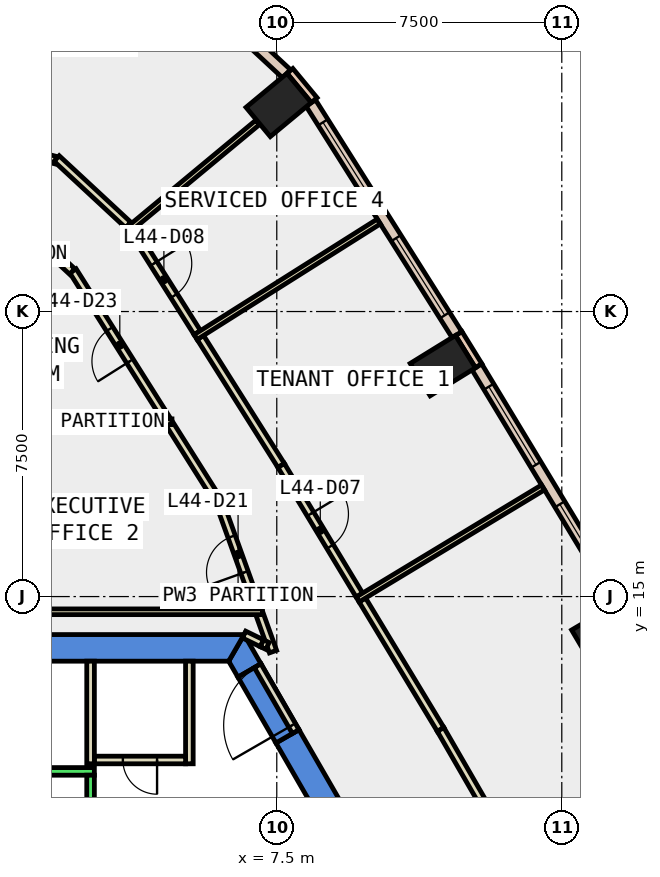
"""IFC4 building model, lengths in metres.
Left out: names, types, materials, properties, quantities, classifications, styles, units other than length and angle.
Written with IfcOpenShell. Run it as: python <this file> out.ifc"""

import sys

from ifc_helpers import new_model, si_unit, direction, frame, frame_2d, origin, origin_2d, place, context, subcontext, project, spatial, polyline, rectangle, outline, extrude, element, fill, save


model = new_model("IFC4")
c1 = context("Model", 3, precision=1e-05, world=origin(), true_north=direction((0.0, 1.0)))
c2 = subcontext(c1, "Body", "Model", "MODEL_VIEW")
j1 = project(units=[si_unit("LENGTHUNIT", "METRE"), si_unit("PLANEANGLEUNIT", "RADIAN")], contexts=[c1])
p1 = place(None, origin())
s1 = spatial("IfcSite", under=j1, at=p1, CompositionType="ELEMENT")
p2 = place(p1, origin())
s2 = spatial("IfcBuilding", under=s1, at=p2, CompositionType="ELEMENT")
p3 = place(p2, frame((0.0, 0.0, 198.2)))
s3 = spatial("IfcBuildingStorey", under=s2, at=p3, CompositionType="ELEMENT", Elevation=198.2)
for number, where, z_axis, x_axis in (
    (1, (16.116, 14.046, -0.4), (0.0, 0.0, 1.0), (-0.509, 0.861, 0.0)),
    (2, (11.869, 21.076, -0.4), (0.0, 0.0, 1.0), (-0.525, 0.851, 0.0)),
    (3, (7.549, 27.935, -0.4), (0.0, 0.0, 1.0), (-0.639, 0.769, 0.0)),
):
    element("IfcColumn", number, at=place(p3, frame(where, z_axis=z_axis, x_axis=x_axis)), inside=s3, PredefinedType="COLUMN", context=c2, shape_type="SweptSolid", body=[
        extrude(rectangle(XDim=1.0, YDim=1.4, at=origin_2d()), origin(), (0.0, 0.0, 1.0), 4.2),
    ])
p4 = place(p3, frame((0.0, 0.0, -0.4)))
e4 = element("IfcWall", 4, at=p4, inside=s3, PredefinedType="SHEAR", context=c2, shape_type="SweptSolid", body=[
    extrude(outline(polyline([(8.084, 11.498), (7.478, 11.148), (12.471, 2.5), (13.279, 2.5), (8.084, 11.498)])), origin(), (0.0, 0.0, 1.0), 4.2),
])
p5 = place(p3, frame((0.0, 0.0, -0.4)))
e5 = element("IfcWall", 5, at=p5, inside=s3, PredefinedType="SHEAR", context=c2, shape_type="SweptSolid", body=[
    extrude(outline(polyline([(6.478, 12.88), (7.084, 13.23), (6.64, 14.0), (6.235, 13.3), (6.478, 12.88)])), origin(), (0.0, 0.0, 1.0), 4.2),
])
p6 = place(p3, frame((0.0, 0.0, 3.6)))
e6 = element("IfcWall", 6, at=p6, inside=s3, PredefinedType="SHEAR", context=c2, shape_type="SweptSolid", body=[
    extrude(outline(polyline([(7.084, 13.23), (6.478, 12.88), (7.478, 11.148), (8.084, 11.498), (7.084, 13.23)])), origin(), (0.0, 0.0, 1.0), 0.2),
])
p7 = place(p3, frame((0.0, 0.0, -0.4)))
e7 = element("IfcWall", 7, at=p7, inside=s3, PredefinedType="SHEAR", context=c2, shape_type="SweptSolid", body=[
    extrude(outline(polyline([(6.64, 14.0), (-6.64, 14.0), (-6.235, 13.3), (6.235, 13.3), (6.64, 14.0)])), origin(), (0.0, 0.0, 1.0), 4.2),
])
p8 = place(p3, frame((12.813, 21.071, 0.0), z_axis=(0.0, 0.0, 1.0), x_axis=(-0.525648735675, 0.850701714282, 0.0)))
e8 = element("IfcWall", 8, at=p8, inside=s3, PredefinedType="STANDARD", context=c2, shape_type="SweptSolid", body=[
    extrude(rectangle(XDim=1.0, YDim=0.2, at=frame_2d((0.5, 0.0))), origin(), (0.0, 0.0, 1.0), 3.8),
])
p9 = place(p3, frame((8.484, 28.061, 0.0), z_axis=(0.0, 0.0, 1.0), x_axis=(-0.637972365578, 0.770059257953, 0.0)))
e9 = element("IfcWall", 9, at=p9, inside=s3, PredefinedType="STANDARD", context=c2, shape_type="SweptSolid", body=[
    extrude(rectangle(XDim=1.0, YDim=0.2, at=frame_2d((0.5, 0.0))), origin(), (0.0, 0.0, 1.0), 3.8),
])
p10 = place(p3, frame((16.504, 14.855, 0.0), z_axis=(0.0, 0.0, 1.0), x_axis=(-0.517159962006, 0.855888762456, 0.0)))
e10 = element("IfcWall", 10, at=p10, inside=s3, PredefinedType="STANDARD", context=c2, shape_type="SweptSolid", body=[
    extrude(rectangle(XDim=7.23, YDim=0.3, at=frame_2d((3.615, 0.0))), origin(), (0.0, 0.0, 1.0), 3.8),
])
p11 = place(p10, frame((0.607, 0.0, 0.9)))
e11 = element("IfcOpeningElement", 11, at=p11, cuts=e10, PredefinedType="OPENING", context=c2, shape_type="SweptSolid", body=[
    extrude(rectangle(XDim=2.4, YDim=2.6, at=frame_2d((1.2, 1.3))), frame((0.0, 0.16, 0.0), z_axis=(0.0, -1.0, 0.0), x_axis=(1.0, 0.0, 0.0)), (0.0, 0.0, 1.0), 0.32),
])
p12 = place(p10, frame((4.222, 0.0, 0.9)))
e12 = element("IfcOpeningElement", 12, at=p12, cuts=e10, PredefinedType="OPENING", context=c2, shape_type="SweptSolid", body=[
    extrude(rectangle(XDim=2.4, YDim=2.6, at=frame_2d((1.2, 1.3))), frame((0.0, 0.16, 0.0), z_axis=(0.0, -1.0, 0.0), x_axis=(1.0, 0.0, 0.0)), (0.0, 0.0, 1.0), 0.32),
])
p13 = place(p3, frame((12.241, 21.892, 0.0), z_axis=(0.0, 0.0, 1.0), x_axis=(-0.533680752529, 0.845686025887, 0.0)))
e13 = element("IfcWall", 13, at=p13, inside=s3, PredefinedType="STANDARD", context=c2, shape_type="SweptSolid", body=[
    extrude(rectangle(XDim=7.208, YDim=0.3, at=frame_2d((3.604, 0.0))), origin(), (0.0, 0.0, 1.0), 3.8),
])
p14 = place(p13, frame((0.602, 0.0, 0.9)))
e14 = element("IfcOpeningElement", 14, at=p14, cuts=e13, PredefinedType="OPENING", context=c2, shape_type="SweptSolid", body=[
    extrude(rectangle(XDim=2.4, YDim=2.6, at=frame_2d((1.2, 1.3))), frame((0.0, 0.16, 0.0), z_axis=(0.0, -1.0, 0.0), x_axis=(1.0, 0.0, 0.0)), (0.0, 0.0, 1.0), 0.32),
])
p15 = place(p13, frame((4.206, 0.0, 0.9)))
e15 = element("IfcOpeningElement", 15, at=p15, cuts=e13, PredefinedType="OPENING", context=c2, shape_type="SweptSolid", body=[
    extrude(rectangle(XDim=2.4, YDim=2.6, at=frame_2d((1.2, 1.3))), frame((0.0, 0.16, 0.0), z_axis=(0.0, -1.0, 0.0), x_axis=(1.0, 0.0, 0.0)), (0.0, 0.0, 1.0), 0.32),
])
p16 = place(p3, frame((7.757, 28.756, 0.0), z_axis=(0.0, 0.0, 1.0), x_axis=(-0.732897351132, 0.680339233547, 0.0)))
e16 = element("IfcWall", 16, at=p16, inside=s3, PredefinedType="STANDARD", context=c2, shape_type="SweptSolid", body=[
    extrude(rectangle(XDim=3.767, YDim=0.3, at=frame_2d((1.884, 0.0))), origin(), (0.0, 0.0, 1.0), 3.8),
])
p17 = place(p16, frame((1.184, 0.0, 0.9)))
e17 = element("IfcOpeningElement", 17, at=p17, cuts=e16, PredefinedType="OPENING", context=c2, shape_type="SweptSolid", body=[
    extrude(rectangle(XDim=1.4, YDim=2.6, at=frame_2d((0.7, 1.3))), frame((0.0, 0.16, 0.0), z_axis=(0.0, -1.0, 0.0), x_axis=(1.0, 0.0, 0.0)), (0.0, 0.0, 1.0), 0.32),
])
p18 = place(p3, frame((6.64, 14.0, 0.0), z_axis=(0.0, 0.0, 1.0), x_axis=(0.899046412443, -0.437853341055, 0.0)))
e18 = element("IfcWall", 18, at=p18, inside=s3, PredefinedType="PARTITIONING", context=c2, shape_type="SweptSolid", body=[
    extrude(rectangle(XDim=0.523, YDim=0.2, at=frame_2d((0.261, 0.0))), origin(), (0.0, 0.0, 1.0), 3.8),
])
p19 = place(p3, frame((7.401, 13.552, 0.0), z_axis=(0.0, 0.0, 1.0), x_axis=(-0.337944878606, 0.941165904091, 0.0)))
e19 = element("IfcWall", 19, at=p19, inside=s3, PredefinedType="PARTITIONING", context=c2, shape_type="SweptSolid", body=[
    extrude(rectangle(XDim=1.038, YDim=0.2, at=frame_2d((0.519, 0.0))), origin(), (0.0, 0.0, 1.0), 3.8),
])
p20 = place(p3, frame((6.999, 14.671, 0.0), z_axis=(0.0, 0.0, 1.0), x_axis=(-0.338795881304, 0.940859899672, 0.0)))
e20 = element("IfcWall", 20, at=p20, inside=s3, PredefinedType="PARTITIONING", context=c2, shape_type="SweptSolid", body=[
    extrude(rectangle(XDim=3.055, YDim=0.2, at=frame_2d((1.527, 0.0))), origin(), (0.0, 0.0, 1.0), 3.8),
])
p21 = place(p20, frame((1.027, 0.0, 0.0)))
e21 = element("IfcOpeningElement", 21, at=p21, cuts=e20, PredefinedType="OPENING", context=c2, shape_type="SweptSolid", body=[
    extrude(rectangle(XDim=1.0, YDim=2.1, at=frame_2d((0.5, 1.05))), frame((0.0, 0.11, 0.0), z_axis=(0.0, -1.0, 0.0), x_axis=(1.0, 0.0, 0.0)), (0.0, 0.0, 1.0), 0.22),
])
p22 = place(p3, frame((5.945, 17.535, 0.0), z_axis=(0.0, 0.0, 1.0), x_axis=(-0.533581643518, 0.845748561749, 0.0)))
e22 = element("IfcWall", 22, at=p22, inside=s3, PredefinedType="PARTITIONING", context=c2, shape_type="SweptSolid", body=[
    extrude(rectangle(XDim=2.367, YDim=0.2, at=frame_2d((1.184, 0.0))), origin(), (0.0, 0.0, 1.0), 3.8),
])
p23 = place(p3, frame((4.602, 19.663, 0.0), z_axis=(0.0, 0.0, 1.0), x_axis=(-0.533664968846, 0.845695986171, 0.0)))
e23 = element("IfcWall", 23, at=p23, inside=s3, PredefinedType="PARTITIONING", context=c2, shape_type="SweptSolid", body=[
    extrude(rectangle(XDim=4.621, YDim=0.2, at=frame_2d((2.311, 0.0))), origin(), (0.0, 0.0, 1.0), 3.8),
])
p24 = place(p23, frame((1.81, 0.0, 0.0)))
e24 = element("IfcOpeningElement", 24, at=p24, cuts=e23, PredefinedType="OPENING", context=c2, shape_type="SweptSolid", body=[
    extrude(rectangle(XDim=1.0, YDim=2.1, at=frame_2d((0.5, 1.05))), frame((0.0, 0.11, 0.0), z_axis=(0.0, -1.0, 0.0), x_axis=(1.0, 0.0, 0.0)), (0.0, 0.0, 1.0), 0.22),
])
p25 = place(p3, frame((2.116, 23.554, 0.0), z_axis=(0.0, 0.0, 1.0), x_axis=(-0.732722533409, 0.680527507919, 0.0)))
e25 = element("IfcWall", 25, at=p25, inside=s3, PredefinedType="PARTITIONING", context=c2, shape_type="SweptSolid", body=[
    extrude(rectangle(XDim=1.838, YDim=0.2, at=frame_2d((0.919, 0.0))), origin(), (0.0, 0.0, 1.0), 3.8),
])
p26 = place(p3, frame((9.752, 14.911, 0.0), z_axis=(0.0, 0.0, 1.0), x_axis=(0.517135291957, -0.855903668535, 0.0)))
e26 = element("IfcWall", 26, at=p26, inside=s3, PredefinedType="PARTITIONING", context=c2, shape_type="SweptSolid", body=[
    extrude(rectangle(XDim=3.982, YDim=0.2, at=frame_2d((1.991, 0.0))), origin(), (0.0, 0.0, 1.0), 3.8),
])
p27 = place(p3, frame((11.811, 11.503, 0.0), z_axis=(0.0, 0.0, 1.0), x_axis=(0.500013420409, -0.866017655369, 0.0)))
e27 = element("IfcWall", 27, at=p27, inside=s3, PredefinedType="PARTITIONING", context=c2, shape_type="SweptSolid", body=[
    extrude(rectangle(XDim=8.038, YDim=0.2, at=frame_2d((4.019, 0.0))), origin(), (0.0, 0.0, 1.0), 3.8),
])
p28 = place(p27, frame((3.594, 0.0, 0.0)))
e28 = element("IfcOpeningElement", 28, at=p28, cuts=e27, PredefinedType="OPENING", context=c2, shape_type="SweptSolid", body=[
    extrude(rectangle(XDim=1.0, YDim=2.1, at=frame_2d((0.5, 1.05))), frame((0.0, 0.11, 0.0), z_axis=(0.0, -1.0, 0.0), x_axis=(1.0, 0.0, 0.0)), (0.0, 0.0, 1.0), 0.22),
])
p29 = place(p3, frame((5.489, 21.817, 0.0), z_axis=(0.0, 0.0, 1.0), x_axis=(0.533790022325, -0.845617059943, 0.0)))
e29 = element("IfcWall", 29, at=p29, inside=s3, PredefinedType="PARTITIONING", context=c2, shape_type="SweptSolid", body=[
    extrude(rectangle(XDim=3.983, YDim=0.2, at=frame_2d((1.991, 0.0))), origin(), (0.0, 0.0, 1.0), 3.8),
])
p30 = place(p3, frame((7.615, 18.449, 0.0), z_axis=(0.0, 0.0, 1.0), x_axis=(0.516918251554, -0.856034766356, 0.0)))
e30 = element("IfcWall", 30, at=p30, inside=s3, PredefinedType="PARTITIONING", context=c2, shape_type="SweptSolid", body=[
    extrude(rectangle(XDim=3.983, YDim=0.2, at=frame_2d((1.992, 0.0))), origin(), (0.0, 0.0, 1.0), 3.8),
])
p31 = place(p30, frame((1.492, 0.0, 0.0)))
e31 = element("IfcOpeningElement", 31, at=p31, cuts=e30, PredefinedType="OPENING", context=c2, shape_type="SweptSolid", body=[
    extrude(rectangle(XDim=1.0, YDim=2.1, at=frame_2d((0.5, 1.05))), frame((0.0, 0.11, 0.0), z_axis=(0.0, -1.0, 0.0), x_axis=(1.0, 0.0, 0.0)), (0.0, 0.0, 1.0), 0.22),
])
p32 = place(p3, frame((3.65, 24.731, 0.0), z_axis=(0.0, 0.0, 1.0), x_axis=(0.533756056831, -0.845638499476, 0.0)))
e32 = element("IfcWall", 32, at=p32, inside=s3, PredefinedType="PARTITIONING", context=c2, shape_type="SweptSolid", body=[
    extrude(rectangle(XDim=3.296, YDim=0.2, at=frame_2d((1.648, 0.0))), origin(), (0.0, 0.0, 1.0), 3.8),
])
p33 = place(p32, frame((1.148, 0.0, 0.0)))
e33 = element("IfcOpeningElement", 33, at=p33, cuts=e32, PredefinedType="OPENING", context=c2, shape_type="SweptSolid", body=[
    extrude(rectangle(XDim=1.0, YDim=2.1, at=frame_2d((0.5, 1.05))), frame((0.0, 0.11, 0.0), z_axis=(0.0, -1.0, 0.0), x_axis=(1.0, 0.0, 0.0)), (0.0, 0.0, 1.0), 0.22),
])
p34 = place(p3, frame((-0.097, 26.936, 0.0), z_axis=(0.0, 0.0, 1.0), x_axis=(0.969093707519, -0.246692898252, 0.0)))
e34 = element("IfcWall", 34, at=p34, inside=s3, PredefinedType="PARTITIONING", context=c2, shape_type="SweptSolid", body=[
    extrude(rectangle(XDim=1.837, YDim=0.2, at=frame_2d((0.918, 0.0))), origin(), (0.0, 0.0, 1.0), 3.8),
])
p35 = place(p3, frame((1.707, 26.526, 0.0), z_axis=(0.0, 0.0, 1.0), x_axis=(0.732939008525, -0.680294355248, 0.0)))
e35 = element("IfcWall", 35, at=p35, inside=s3, PredefinedType="PARTITIONING", context=c2, shape_type="SweptSolid", body=[
    extrude(rectangle(XDim=2.569, YDim=0.2, at=frame_2d((1.285, 0.0))), origin(), (0.0, 0.0, 1.0), 3.8),
])
p36 = place(p3, frame((5.2, 13.3, 0.0), z_axis=(0.0, 0.0, 1.0), x_axis=(0.0, -1.0, 0.0)))
e36 = element("IfcWall", 36, at=p36, inside=s3, PredefinedType="PARTITIONING", context=c2, shape_type="SweptSolid", body=[
    extrude(rectangle(XDim=2.7, YDim=0.2, at=frame_2d((1.35, 0.0))), origin(), (0.0, 0.0, 1.0), 3.8),
])
p37 = place(p3, frame((5.1, 10.7, 0.0), z_axis=(0.0, 0.0, 1.0), x_axis=(-1.0, 0.0, 0.0)))
e37 = element("IfcWall", 37, at=p37, inside=s3, PredefinedType="PARTITIONING", context=c2, shape_type="SweptSolid", body=[
    extrude(rectangle(XDim=2.4, YDim=0.2, at=frame_2d((1.2, 0.0))), origin(), (0.0, 0.0, 1.0), 3.8),
])
p38 = place(p37, frame((0.75, 0.0, 0.0)))
e38 = element("IfcOpeningElement", 38, at=p38, cuts=e37, PredefinedType="OPENING", context=c2, shape_type="SweptSolid", body=[
    extrude(rectangle(XDim=0.9, YDim=2.1, at=frame_2d((0.45, 1.05))), frame((0.0, 0.11, 0.0), z_axis=(0.0, -1.0, 0.0), x_axis=(1.0, 0.0, 0.0)), (0.0, 0.0, 1.0), 0.22),
])
p39 = place(p3, frame((2.6, 10.6, 0.0), z_axis=(0.0, 0.0, 1.0), x_axis=(0.0, 1.0, 0.0)))
e39 = element("IfcWall", 39, at=p39, inside=s3, PredefinedType="PARTITIONING", context=c2, shape_type="SweptSolid", body=[
    extrude(rectangle(XDim=2.7, YDim=0.2, at=frame_2d((1.35, 0.0))), origin(), (0.0, 0.0, 1.0), 3.8),
])
p40 = place(p3, frame((7.124, 14.6, 0.0), z_axis=(0.0, 0.0, 1.0), x_axis=(-1.0, 0.0, 0.0)))
e40 = element("IfcWall", 40, at=p40, inside=s3, PredefinedType="PARTITIONING", context=c2, shape_type="SweptSolid", body=[
    extrude(rectangle(XDim=6.724, YDim=0.15, at=frame_2d((3.362, 0.0))), origin(), (0.0, 0.0, 1.0), 3.8),
])
p41 = place(p3, frame((0.4, 19.6, 0.0), z_axis=(0.0, 0.0, 1.0), x_axis=(1.0, 0.0, 0.0)))
e41 = element("IfcWall", 41, at=p41, inside=s3, PredefinedType="PARTITIONING", context=c2, shape_type="SweptSolid", body=[
    extrude(rectangle(XDim=4.342, YDim=0.15, at=frame_2d((2.171, 0.0))), origin(), (0.0, 0.0, 1.0), 3.8),
])
p42 = place(p3, frame((9.628, 14.924, 0.0), z_axis=(0.0, 0.0, 1.0), x_axis=(0.855931736607, 0.517088834021, 0.0)))
e42 = element("IfcWall", 42, at=p42, inside=s3, PredefinedType="PARTITIONING", context=c2, shape_type="SweptSolid", body=[
    extrude(rectangle(XDim=5.699, YDim=0.15, at=frame_2d((2.85, 0.0))), origin(), (0.0, 0.0, 1.0), 3.8),
])
p43 = place(p3, frame((5.364, 21.827, 0.0), z_axis=(0.0, 0.0, 1.0), x_axis=(0.845716787596, 0.533632003517, 0.0)))
e43 = element("IfcWall", 43, at=p43, inside=s3, PredefinedType="PARTITIONING", context=c2, shape_type="SweptSolid", body=[
    extrude(rectangle(XDim=5.7, YDim=0.15, at=frame_2d((2.85, 0.0))), origin(), (0.0, 0.0, 1.0), 3.8),
])
p44 = place(p3, frame((3.586, 24.646, 0.0), z_axis=(0.0, 0.0, 1.0), x_axis=(0.769538645463, 0.638600245176, 0.0)))
e44 = element("IfcWall", 44, at=p44, inside=s3, PredefinedType="PARTITIONING", context=c2, shape_type="SweptSolid", body=[
    extrude(rectangle(XDim=4.43, YDim=0.15, at=frame_2d((2.215, 0.0))), origin(), (0.0, 0.0, 1.0), 3.8),
])
p45 = place(p3, frame((7.997, 11.448, 0.0), z_axis=(0.0, 0.0, 1.0), x_axis=(-0.50002537861, 0.866010750942, 0.0)))
e45 = element("IfcWall", 45, at=p45, inside=s3, PredefinedType="PARTITIONING", context=c2, shape_type="SweptSolid", body=[
    extrude(rectangle(XDim=2.0, YDim=0.2, at=frame_2d((1.0, 0.0))), origin(), (0.0, 0.0, 1.0), 2.4),
])
p46 = place(p45, frame((0.19, 0.0, 0.0)))
e46 = element("IfcOpeningElement", 46, at=p46, cuts=e45, PredefinedType="OPENING", context=c2, shape_type="SweptSolid", body=[
    extrude(rectangle(XDim=1.8, YDim=2.1, at=frame_2d((0.9, 1.05))), frame((0.0, 0.11, 0.0), z_axis=(0.0, -1.0, 0.0), x_axis=(1.0, 0.0, 0.0)), (0.0, 0.0, 1.0), 0.22),
])
p47 = place(p3, frame((7.11, 13.771, 0.0), z_axis=(0.0, 0.0, 1.0), x_axis=(0.900120852209, -0.435640277545, 0.0)))
e47 = element("IfcWall", 47, at=p47, inside=s3, PredefinedType="PARTITIONING", context=c2, shape_type="SweptSolid", body=[
    extrude(rectangle(XDim=0.161, YDim=0.2, at=frame_2d((0.081, 0.0))), origin(), (0.0, 0.0, 1.0), 2.4),
])
p48 = place(p3, frame((2.7, 10.4, 0.0), z_axis=(0.0, 0.0, 1.0), x_axis=(-1.0, 0.0, 0.0)))
e48 = element("IfcWall", 48, at=p48, inside=s3, PredefinedType="STANDARD", context=c2, shape_type="SweptSolid", body=[
    extrude(rectangle(XDim=5.4, YDim=0.2, at=frame_2d((2.7, 0.0))), origin(), (0.0, 0.0, 1.0), 3.8),
])
p49 = place(p3, frame((2.6, 7.9, 0.0), z_axis=(0.0, 0.0, 1.0), x_axis=(0.0, 1.0, 0.0)))
e49 = element("IfcWall", 49, at=p49, inside=s3, PredefinedType="STANDARD", context=c2, shape_type="SweptSolid", body=[
    extrude(rectangle(XDim=2.4, YDim=0.2, at=frame_2d((1.2, 0.0))), origin(), (0.0, 0.0, 1.0), 3.8),
])
p50 = place(p11, origin())
e50 = element("IfcWindow", 50, at=p50, inside=s3, PartitioningType="SINGLE_PANEL", PredefinedType="WINDOW", context=c2, shape_type="SweptSolid", body=[
    extrude(rectangle(XDim=2.4, YDim=2.6, at=frame_2d((1.2, 1.3))), frame((0.0, 0.03, 0.0), z_axis=(0.0, -1.0, 0.0), x_axis=(1.0, 0.0, 0.0)), (0.0, 0.0, 1.0), 0.06),
])
fill(e11, e50)
p51 = place(p12, origin())
e51 = element("IfcWindow", 51, at=p51, inside=s3, PartitioningType="SINGLE_PANEL", PredefinedType="WINDOW", context=c2, shape_type="SweptSolid", body=[
    extrude(rectangle(XDim=2.4, YDim=2.6, at=frame_2d((1.2, 1.3))), frame((0.0, 0.03, 0.0), z_axis=(0.0, -1.0, 0.0), x_axis=(1.0, 0.0, 0.0)), (0.0, 0.0, 1.0), 0.06),
])
fill(e12, e51)
p52 = place(p14, origin())
e52 = element("IfcWindow", 52, at=p52, inside=s3, PartitioningType="SINGLE_PANEL", PredefinedType="WINDOW", context=c2, shape_type="SweptSolid", body=[
    extrude(rectangle(XDim=2.4, YDim=2.6, at=frame_2d((1.2, 1.3))), frame((0.0, 0.03, 0.0), z_axis=(0.0, -1.0, 0.0), x_axis=(1.0, 0.0, 0.0)), (0.0, 0.0, 1.0), 0.06),
])
fill(e14, e52)
p53 = place(p15, origin())
e53 = element("IfcWindow", 53, at=p53, inside=s3, PartitioningType="SINGLE_PANEL", PredefinedType="WINDOW", context=c2, shape_type="SweptSolid", body=[
    extrude(rectangle(XDim=2.4, YDim=2.6, at=frame_2d((1.2, 1.3))), frame((0.0, 0.03, 0.0), z_axis=(0.0, -1.0, 0.0), x_axis=(1.0, 0.0, 0.0)), (0.0, 0.0, 1.0), 0.06),
])
fill(e15, e53)
p54 = place(p31, origin())
e54 = element("IfcDoor", 54, at=p54, inside=s3, OperationType="SINGLE_SWING_LEFT", PredefinedType="DOOR", context=c2, shape_type="SweptSolid", body=[
    extrude(rectangle(XDim=1.0, YDim=2.1, at=frame_2d((0.5, 1.05))), frame((0.0, 0.025, 0.0), z_axis=(0.0, -1.0, 0.0), x_axis=(1.0, 0.0, 0.0)), (0.0, 0.0, 1.0), 0.05),
])
fill(e31, e54)
p55 = place(p33, origin())
e55 = element("IfcDoor", 55, at=p55, inside=s3, OperationType="SINGLE_SWING_LEFT", PredefinedType="DOOR", context=c2, shape_type="SweptSolid", body=[
    extrude(rectangle(XDim=1.0, YDim=2.1, at=frame_2d((0.5, 1.05))), frame((0.0, 0.025, 0.0), z_axis=(0.0, -1.0, 0.0), x_axis=(1.0, 0.0, 0.0)), (0.0, 0.0, 1.0), 0.05),
])
fill(e33, e55)
p56 = place(p21, origin())
e56 = element("IfcDoor", 56, at=p56, inside=s3, OperationType="SINGLE_SWING_LEFT", PredefinedType="DOOR", context=c2, shape_type="SweptSolid", body=[
    extrude(rectangle(XDim=1.0, YDim=2.1, at=frame_2d((0.5, 1.05))), frame((0.0, 0.025, 0.0), z_axis=(0.0, -1.0, 0.0), x_axis=(1.0, 0.0, 0.0)), (0.0, 0.0, 1.0), 0.05),
])
fill(e21, e56)
p57 = place(p24, origin())
e57 = element("IfcDoor", 57, at=p57, inside=s3, OperationType="SINGLE_SWING_LEFT", PredefinedType="DOOR", context=c2, shape_type="SweptSolid", body=[
    extrude(rectangle(XDim=1.0, YDim=2.1, at=frame_2d((0.5, 1.05))), frame((0.0, 0.025, 0.0), z_axis=(0.0, -1.0, 0.0), x_axis=(1.0, 0.0, 0.0)), (0.0, 0.0, 1.0), 0.05),
])
fill(e24, e57)
p58 = place(p38, origin())
e58 = element("IfcDoor", 58, at=p58, inside=s3, OperationType="SINGLE_SWING_RIGHT", PredefinedType="DOOR", context=c2, shape_type="SweptSolid", body=[
    extrude(rectangle(XDim=0.9, YDim=2.1, at=frame_2d((0.45, 1.05))), frame((0.0, 0.025, 0.0), z_axis=(0.0, -1.0, 0.0), x_axis=(1.0, 0.0, 0.0)), (0.0, 0.0, 1.0), 0.05),
])
fill(e38, e58)
p59 = place(p46, origin())
e59 = element("IfcDoor", 59, at=p59, inside=s3, OperationType="DOUBLE_DOOR_SINGLE_SWING", PredefinedType="DOOR", context=c2, shape_type="SweptSolid", body=[
    extrude(rectangle(XDim=1.8, YDim=2.1, at=frame_2d((0.9, 1.05))), frame((0.0, 0.025, 0.0), z_axis=(0.0, -1.0, 0.0), x_axis=(1.0, 0.0, 0.0)), (0.0, 0.0, 1.0), 0.05),
])
fill(e46, e59)
save(model, sys.argv[1])
